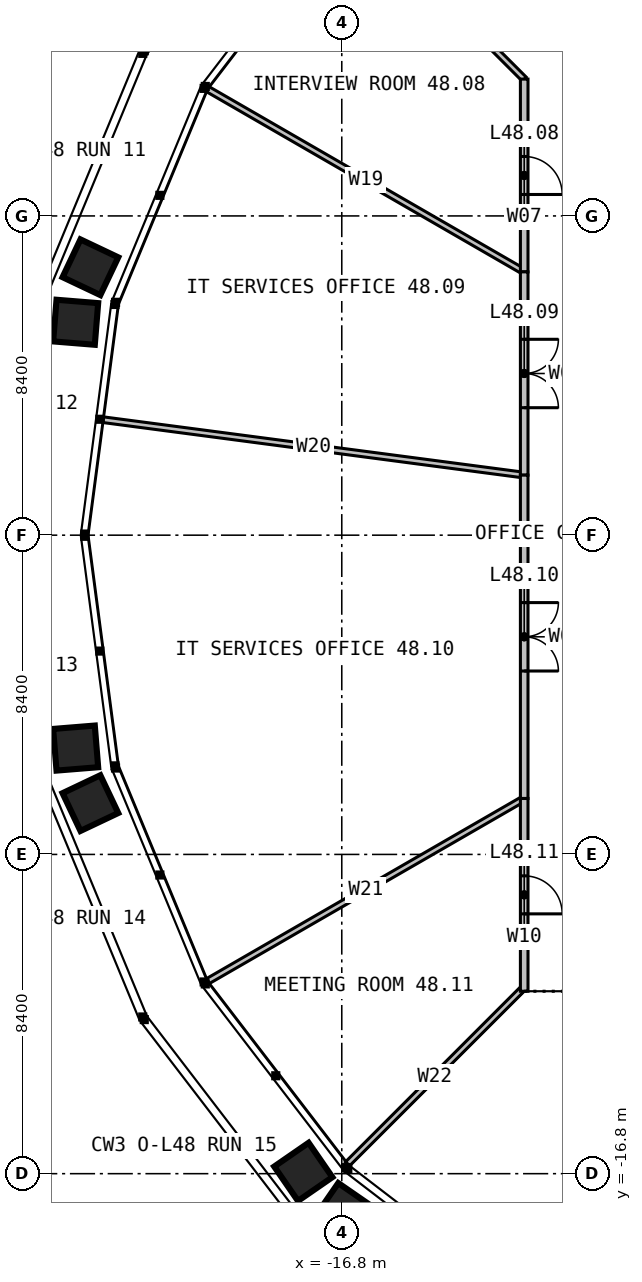
"""IFC4 building model, lengths in metres.
Left out: names, types, materials, properties, quantities, classifications, styles, units other than length and angle.
Written with IfcOpenShell. Run it as: python <this file> out.ifc"""

import sys

from ifc_helpers import new_model, si_unit, direction, frame, frame_2d, origin, place, context, subcontext, project, spatial, rectangle, extrude, element, fill, save


model = new_model("IFC4")
c1 = context("Model", 3, precision=1e-05, world=origin(), true_north=direction((0.0, 1.0)))
c2 = subcontext(c1, "Body", "Model", "MODEL_VIEW")
j1 = project(units=[si_unit("LENGTHUNIT", "METRE"), si_unit("PLANEANGLEUNIT", "RADIAN")], contexts=[c1])
p1 = place(None, origin())
s1 = spatial("IfcSite", under=j1, at=p1, CompositionType="ELEMENT")
p2 = place(p1, origin())
s2 = spatial("IfcBuilding", under=s1, at=p2, CompositionType="ELEMENT")
p3 = place(p2, frame((0.0, 0.0, 199.0)))
s3 = spatial("IfcBuildingStorey", under=s2, at=p3, CompositionType="ELEMENT", Elevation=199.0)
p4 = place(p3, frame((-6.928, 12.0, 0.0), z_axis=(0.0, 0.0, 1.0), x_axis=(-0.499990471717, 0.866030904871, 0.0)))
e1 = element("IfcWall", 1, at=p4, inside=s3, PredefinedType="PARTITIONING", context=c2, shape_type="SweptSolid", body=[
    extrude(rectangle(XDim=9.62, YDim=0.15, at=frame_2d((4.81, 0.0))), origin(), (0.0, 0.0, 1.0), 2.79),
])
p5 = place(p3, frame((-12.0, 12.0, 0.0), z_axis=(0.0, 0.0, 1.0), x_axis=(-0.707106781187, 0.707106781187, 0.0)))
e2 = element("IfcWall", 2, at=p5, inside=s3, PredefinedType="PARTITIONING", context=c2, shape_type="SweptSolid", body=[
    extrude(rectangle(XDim=6.506, YDim=0.15, at=frame_2d((3.253, 0.0))), origin(), (0.0, 0.0, 1.0), 2.79),
])
p6 = place(p3, frame((-12.0, 6.928, 0.0), z_axis=(0.0, 0.0, 1.0), x_axis=(-0.866030904871, 0.499990471717, 0.0)))
e3 = element("IfcWall", 3, at=p6, inside=s3, PredefinedType="PARTITIONING", context=c2, shape_type="SweptSolid", body=[
    extrude(rectangle(XDim=9.62, YDim=0.15, at=frame_2d((4.81, 0.0))), origin(), (0.0, 0.0, 1.0), 2.79),
])
p7 = place(p3, frame((-12.0, 1.58, 0.0), z_axis=(0.0, 0.0, 1.0), x_axis=(-0.991444325482, 0.130530262654, 0.0)))
e4 = element("IfcWall", 4, at=p7, inside=s3, PredefinedType="PARTITIONING", context=c2, shape_type="SweptSolid", body=[
    extrude(rectangle(XDim=11.172, YDim=0.15, at=frame_2d((5.586, 0.0))), origin(), (0.0, 0.0, 1.0), 2.79),
])
p8 = place(p3, frame((-12.0, -6.928, 0.0), z_axis=(0.0, 0.0, 1.0), x_axis=(-0.866030904871, -0.499990471717, 0.0)))
e5 = element("IfcWall", 5, at=p8, inside=s3, PredefinedType="PARTITIONING", context=c2, shape_type="SweptSolid", body=[
    extrude(rectangle(XDim=9.62, YDim=0.15, at=frame_2d((4.81, 0.0))), origin(), (0.0, 0.0, 1.0), 2.79),
])
p9 = place(p3, frame((-12.053, -11.947, 0.0), z_axis=(0.0, 0.0, 1.0), x_axis=(-0.707125544551, -0.707088017324, 0.0)))
e6 = element("IfcWall", 6, at=p9, inside=s3, PredefinedType="PARTITIONING", context=c2, shape_type="SweptSolid", body=[
    extrude(rectangle(XDim=6.506, YDim=0.15, at=frame_2d((3.253, 0.0))), origin(), (0.0, 0.0, 1.0), 2.79),
])
p10 = place(p3, frame((-12.0, 12.0, 0.0), z_axis=(0.0, 0.0, 1.0), x_axis=(0.0, -1.0, 0.0)))
e7 = element("IfcWall", 7, at=p10, inside=s3, PredefinedType="PARTITIONING", context=c2, shape_type="SweptSolid", body=[
    extrude(rectangle(XDim=5.072, YDim=0.2, at=frame_2d((2.536, 0.0))), origin(), (0.0, 0.0, 1.0), 3.8),
])
p11 = place(p10, frame((2.036, 0.0, 0.0)))
e8 = element("IfcOpeningElement", 8, at=p11, cuts=e7, PredefinedType="OPENING", context=c2, shape_type="SweptSolid", body=[
    extrude(rectangle(XDim=1.0, YDim=2.2, at=frame_2d((0.5, 1.1))), frame((0.0, 0.11, 0.0), z_axis=(0.0, -1.0, 0.0), x_axis=(1.0, 0.0, 0.0)), (0.0, 0.0, 1.0), 0.22),
])
p12 = place(p3, frame((-12.0, 6.928, 0.0), z_axis=(0.0, 0.0, 1.0), x_axis=(0.0, -1.0, 0.0)))
e9 = element("IfcWall", 9, at=p12, inside=s3, PredefinedType="PARTITIONING", context=c2, shape_type="SweptSolid", body=[
    extrude(rectangle(XDim=5.348, YDim=0.2, at=frame_2d((2.674, 0.0))), origin(), (0.0, 0.0, 1.0), 3.8),
])
p13 = place(p12, frame((1.774, 0.0, 0.0)))
e10 = element("IfcOpeningElement", 10, at=p13, cuts=e9, PredefinedType="OPENING", context=c2, shape_type="SweptSolid", body=[
    extrude(rectangle(XDim=1.8, YDim=2.2, at=frame_2d((0.9, 1.1))), frame((0.0, 0.11, 0.0), z_axis=(0.0, -1.0, 0.0), x_axis=(1.0, 0.0, 0.0)), (0.0, 0.0, 1.0), 0.22),
])
p14 = place(p3, frame((-12.0, 1.58, 0.0), z_axis=(0.0, 0.0, 1.0), x_axis=(0.0, -1.0, 0.0)))
e11 = element("IfcWall", 11, at=p14, inside=s3, PredefinedType="PARTITIONING", context=c2, shape_type="SweptSolid", body=[
    extrude(rectangle(XDim=8.508, YDim=0.2, at=frame_2d((4.254, 0.0))), origin(), (0.0, 0.0, 1.0), 3.8),
])
p15 = place(p14, frame((3.354, 0.0, 0.0)))
e12 = element("IfcOpeningElement", 12, at=p15, cuts=e11, PredefinedType="OPENING", context=c2, shape_type="SweptSolid", body=[
    extrude(rectangle(XDim=1.8, YDim=2.2, at=frame_2d((0.9, 1.1))), frame((0.0, 0.11, 0.0), z_axis=(0.0, -1.0, 0.0), x_axis=(1.0, 0.0, 0.0)), (0.0, 0.0, 1.0), 0.22),
])
p16 = place(p3, frame((-12.0, -6.928, 0.0), z_axis=(0.0, 0.0, 1.0), x_axis=(0.0, -1.0, 0.0)))
e13 = element("IfcWall", 13, at=p16, inside=s3, PredefinedType="PARTITIONING", context=c2, shape_type="SweptSolid", body=[
    extrude(rectangle(XDim=5.072, YDim=0.2, at=frame_2d((2.536, 0.0))), origin(), (0.0, 0.0, 1.0), 3.8),
])
p17 = place(p16, frame((2.036, 0.0, 0.0)))
e14 = element("IfcOpeningElement", 14, at=p17, cuts=e13, PredefinedType="OPENING", context=c2, shape_type="SweptSolid", body=[
    extrude(rectangle(XDim=1.0, YDim=2.2, at=frame_2d((0.5, 1.1))), frame((0.0, 0.11, 0.0), z_axis=(0.0, -1.0, 0.0), x_axis=(1.0, 0.0, 0.0)), (0.0, 0.0, 1.0), 0.22),
])
p18 = place(p11, origin())
e15 = element("IfcDoor", 15, at=p18, inside=s3, OperationType="SINGLE_SWING_RIGHT", PredefinedType="DOOR", context=c2, shape_type="SweptSolid", body=[
    extrude(rectangle(XDim=1.0, YDim=2.2, at=frame_2d((0.5, 1.1))), frame((0.0, 0.025, 0.0), z_axis=(0.0, -1.0, 0.0), x_axis=(1.0, 0.0, 0.0)), (0.0, 0.0, 1.0), 0.05),
])
fill(e8, e15)
p19 = place(p13, origin())
e16 = element("IfcDoor", 16, at=p19, inside=s3, OperationType="DOUBLE_DOOR_SINGLE_SWING", PredefinedType="DOOR", context=c2, shape_type="SweptSolid", body=[
    extrude(rectangle(XDim=1.8, YDim=2.2, at=frame_2d((0.9, 1.1))), frame((0.0, 0.025, 0.0), z_axis=(0.0, -1.0, 0.0), x_axis=(1.0, 0.0, 0.0)), (0.0, 0.0, 1.0), 0.05),
])
fill(e10, e16)
p20 = place(p15, origin())
e17 = element("IfcDoor", 17, at=p20, inside=s3, OperationType="DOUBLE_DOOR_SINGLE_SWING", PredefinedType="DOOR", context=c2, shape_type="SweptSolid", body=[
    extrude(rectangle(XDim=1.8, YDim=2.2, at=frame_2d((0.9, 1.1))), frame((0.0, 0.025, 0.0), z_axis=(0.0, -1.0, 0.0), x_axis=(1.0, 0.0, 0.0)), (0.0, 0.0, 1.0), 0.05),
])
fill(e12, e17)
p21 = place(p17, origin())
e18 = element("IfcDoor", 18, at=p21, inside=s3, OperationType="SINGLE_SWING_RIGHT", PredefinedType="DOOR", context=c2, shape_type="SweptSolid", body=[
    extrude(rectangle(XDim=1.0, YDim=2.2, at=frame_2d((0.5, 1.1))), frame((0.0, 0.025, 0.0), z_axis=(0.0, -1.0, 0.0), x_axis=(1.0, 0.0, 0.0)), (0.0, 0.0, 1.0), 0.05),
])
fill(e14, e18)
save(model, sys.argv[1])
